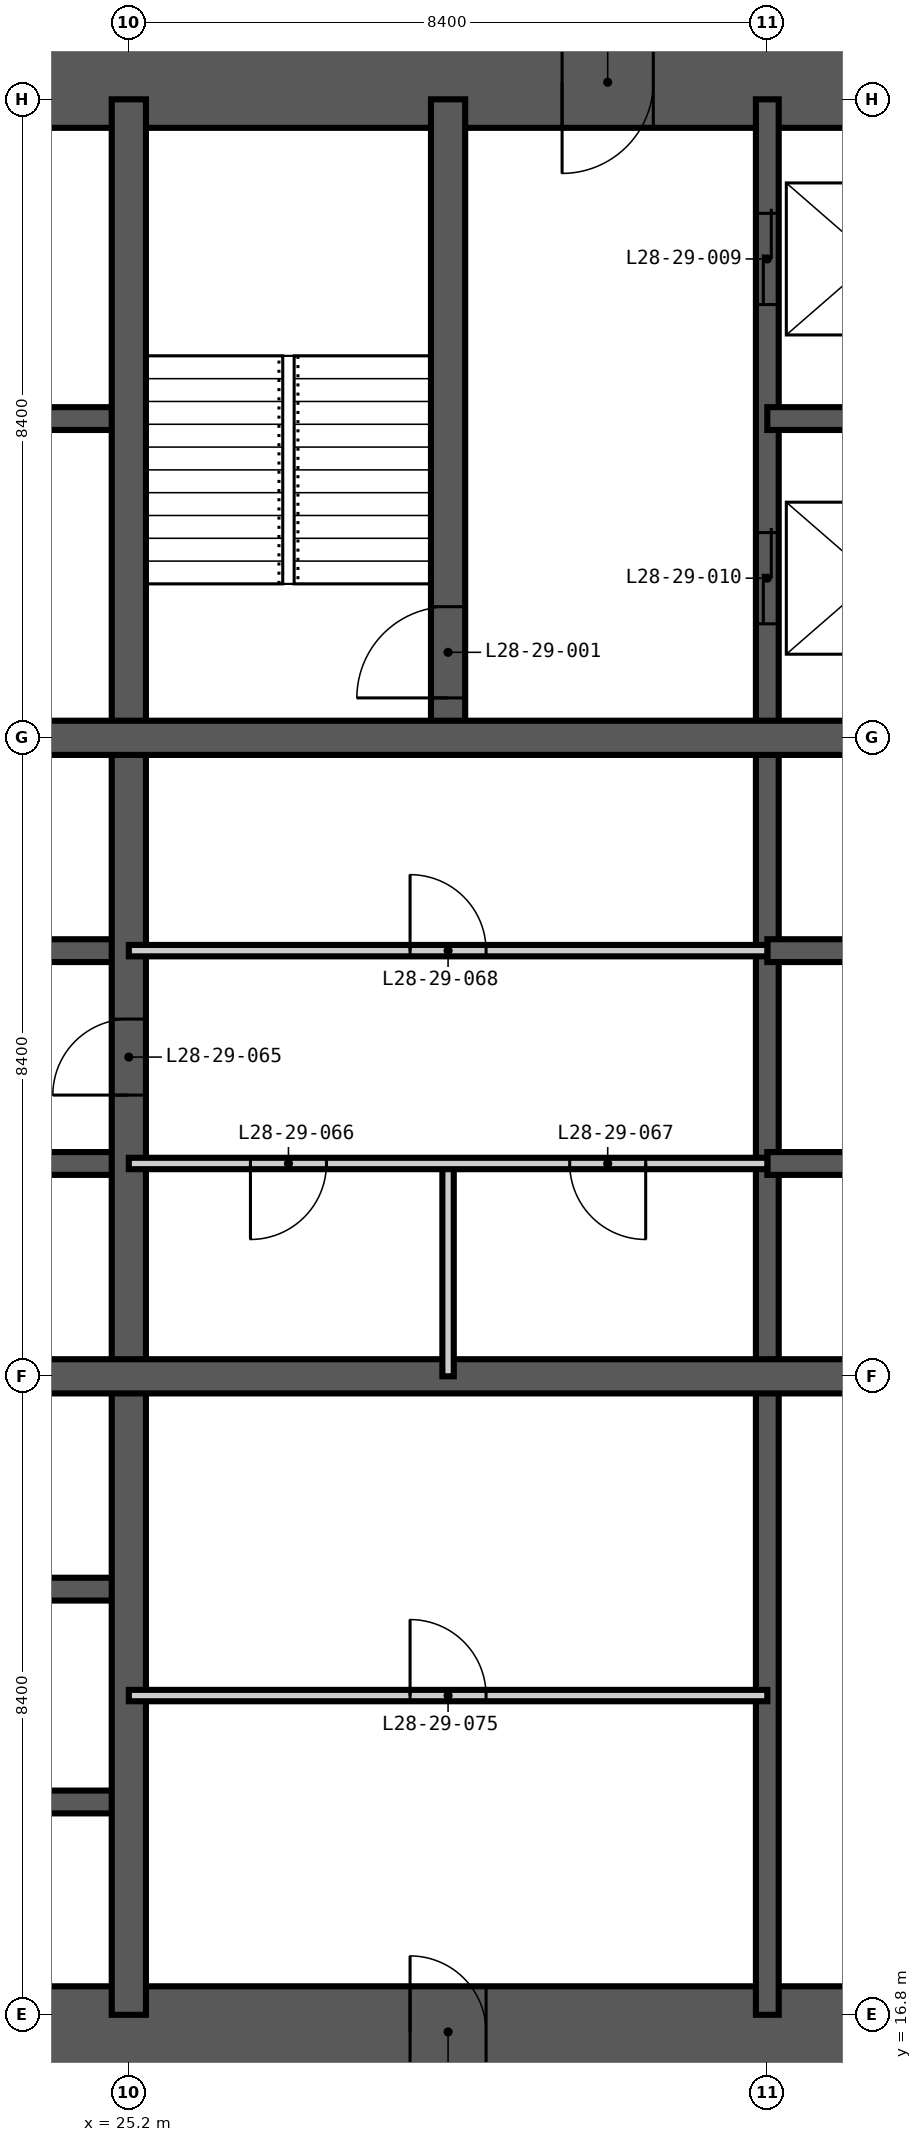
"""IFC4 building model, lengths in metres.
Left out: names, types, materials, properties, quantities, classifications, styles, units other than length and angle.
Written with IfcOpenShell. Run it as: python <this file> out.ifc"""

import sys

from ifc_helpers import new_model, si_unit, direction, frame, frame_2d, origin, place, context, subcontext, project, spatial, rectangle, extrude, element, fill, save


model = new_model("IFC4")
c1 = context("Model", 3, precision=1e-05, world=origin(), true_north=direction((0.0, 1.0)))
c2 = subcontext(c1, "Body", "Model", "MODEL_VIEW")
j1 = project(units=[si_unit("LENGTHUNIT", "METRE"), si_unit("PLANEANGLEUNIT", "RADIAN")], contexts=[c1])
p1 = place(None, origin())
s1 = spatial("IfcSite", under=j1, at=p1, CompositionType="ELEMENT")
p2 = place(p1, origin())
s2 = spatial("IfcBuilding", under=s1, at=p2, CompositionType="ELEMENT")
p3 = place(p2, frame((0.0, 0.0, 111.6)))
s3 = spatial("IfcBuildingStorey", under=s2, at=p3, CompositionType="ELEMENT", Elevation=111.6)
p4 = place(p3, frame((15.975, 16.575, -0.35), z_axis=(0.0, 0.0, 1.0), x_axis=(1.0, 0.0, 0.0)))
e1 = element("IfcWall", 1, at=p4, inside=s3, PredefinedType="SHEAR", context=c2, shape_type="SweptSolid", body=[
    extrude(rectangle(XDim=26.85, YDim=1.2, at=frame_2d((13.425, 0.0))), origin(), (0.0, 0.0, 1.0), 3.6),
])
p5 = place(p4, frame((12.925, 0.0, 0.35)))
e2 = element("IfcOpeningElement", 2, at=p5, cuts=e1, PredefinedType="OPENING", context=c2, shape_type="SweptSolid", body=[
    extrude(rectangle(XDim=1.0, YDim=2.1, at=frame_2d((0.5, 1.05))), frame((0.0, 0.61, 0.0), z_axis=(0.0, -1.0, 0.0), x_axis=(1.0, 0.0, 0.0)), (0.0, 0.0, 1.0), 1.22),
])
p6 = place(p4, frame((19.225, 0.0, 0.35)))
e3 = element("IfcOpeningElement", 3, at=p6, cuts=e1, PredefinedType="OPENING", context=c2, shape_type="SweptSolid", body=[
    extrude(rectangle(XDim=1.0, YDim=2.1, at=frame_2d((0.5, 1.05))), frame((0.0, 0.61, 0.0), z_axis=(0.0, -1.0, 0.0), x_axis=(1.0, 0.0, 0.0)), (0.0, 0.0, 1.0), 1.22),
])
p7 = place(p3, frame((42.825, 42.225, -0.35), z_axis=(0.0, 0.0, 1.0), x_axis=(-1.0, 0.0, 0.0)))
e4 = element("IfcWall", 4, at=p7, inside=s3, PredefinedType="SHEAR", context=c2, shape_type="SweptSolid", body=[
    extrude(rectangle(XDim=26.85, YDim=1.2, at=frame_2d((13.425, 0.0))), origin(), (0.0, 0.0, 1.0), 3.6),
])
p8 = place(p7, frame((21.325, 0.0, 0.35)))
e5 = element("IfcOpeningElement", 5, at=p8, cuts=e4, PredefinedType="OPENING", context=c2, shape_type="SweptSolid", body=[
    extrude(rectangle(XDim=1.0, YDim=2.1, at=frame_2d((0.5, 1.05))), frame((0.0, 0.61, 0.0), z_axis=(0.0, -1.0, 0.0), x_axis=(1.0, 0.0, 0.0)), (0.0, 0.0, 1.0), 1.22),
])
p9 = place(p7, frame((10.725, 0.0, 0.35)))
e6 = element("IfcOpeningElement", 6, at=p9, cuts=e4, PredefinedType="OPENING", context=c2, shape_type="SweptSolid", body=[
    extrude(rectangle(XDim=1.2, YDim=2.2, at=frame_2d((0.6, 1.1))), frame((0.0, 0.61, 0.0), z_axis=(0.0, -1.0, 0.0), x_axis=(1.0, 0.0, 0.0)), (0.0, 0.0, 1.0), 1.22),
])
p10 = place(p3, frame((33.6, 16.8, -0.35), z_axis=(0.0, 0.0, 1.0), x_axis=(0.0, 1.0, 0.0)))
e7 = element("IfcWall", 7, at=p10, inside=s3, PredefinedType="SHEAR", context=c2, shape_type="SweptSolid", body=[
    extrude(rectangle(XDim=25.2, YDim=0.3, at=frame_2d((12.6, 0.0))), origin(), (0.0, 0.0, 1.0), 3.6),
])
p11 = place(p10, frame((22.5, 0.0, 0.35)))
e8 = element("IfcOpeningElement", 8, at=p11, cuts=e7, PredefinedType="OPENING", context=c2, shape_type="SweptSolid", body=[
    extrude(rectangle(XDim=1.2, YDim=2.2, at=frame_2d((0.6, 1.1))), frame((0.0, 0.16, 0.0), z_axis=(0.0, -1.0, 0.0), x_axis=(1.0, 0.0, 0.0)), (0.0, 0.0, 1.0), 0.32),
])
p12 = place(p10, frame((18.3, 0.0, 0.35)))
e9 = element("IfcOpeningElement", 9, at=p12, cuts=e7, PredefinedType="OPENING", context=c2, shape_type="SweptSolid", body=[
    extrude(rectangle(XDim=1.2, YDim=2.2, at=frame_2d((0.6, 1.1))), frame((0.0, 0.16, 0.0), z_axis=(0.0, -1.0, 0.0), x_axis=(1.0, 0.0, 0.0)), (0.0, 0.0, 1.0), 0.32),
])
for number, where, z_axis, x_axis in (
    (10, (16.8, 19.6, -0.35), (0.0, 0.0, 1.0), (1.0, 0.0, 0.0)),
    (11, (16.8, 22.4, -0.35), (0.0, 0.0, 1.0), (1.0, 0.0, 0.0)),
):
    element("IfcWall", number, at=place(p3, frame(where, z_axis=z_axis, x_axis=x_axis)), inside=s3, PredefinedType="SHEAR", context=c2, shape_type="SweptSolid", body=[
        extrude(rectangle(XDim=8.4, YDim=0.3, at=frame_2d((4.2, 0.0))), origin(), (0.0, 0.0, 1.0), 3.6),
    ])
p13 = place(p3, frame((16.8, 28.0, -0.35), z_axis=(0.0, 0.0, 1.0), x_axis=(1.0, 0.0, 0.0)))
e12 = element("IfcWall", 12, at=p13, inside=s3, PredefinedType="SHEAR", context=c2, shape_type="SweptSolid", body=[
    extrude(rectangle(XDim=8.4, YDim=0.3, at=frame_2d((4.2, 0.0))), origin(), (0.0, 0.0, 1.0), 3.6),
])
p14 = place(p13, frame((1.55, 0.0, 0.35)))
e13 = element("IfcOpeningElement", 13, at=p14, cuts=e12, PredefinedType="OPENING", context=c2, shape_type="SweptSolid", body=[
    extrude(rectangle(XDim=1.1, YDim=2.2, at=frame_2d((0.55, 1.1))), frame((0.0, 0.16, 0.0), z_axis=(0.0, -1.0, 0.0), x_axis=(1.0, 0.0, 0.0)), (0.0, 0.0, 1.0), 0.32),
])
p15 = place(p13, frame((5.75, 0.0, 0.35)))
e14 = element("IfcOpeningElement", 14, at=p15, cuts=e12, PredefinedType="OPENING", context=c2, shape_type="SweptSolid", body=[
    extrude(rectangle(XDim=1.1, YDim=2.2, at=frame_2d((0.55, 1.1))), frame((0.0, 0.16, 0.0), z_axis=(0.0, -1.0, 0.0), x_axis=(1.0, 0.0, 0.0)), (0.0, 0.0, 1.0), 0.32),
])
p16 = place(p3, frame((33.6, 28.0, -0.35), z_axis=(0.0, 0.0, 1.0), x_axis=(1.0, 0.0, 0.0)))
e15 = element("IfcWall", 15, at=p16, inside=s3, PredefinedType="SHEAR", context=c2, shape_type="SweptSolid", body=[
    extrude(rectangle(XDim=8.4, YDim=0.3, at=frame_2d((4.2, 0.0))), origin(), (0.0, 0.0, 1.0), 3.6),
])
p17 = place(p16, frame((1.55, 0.0, 0.35)))
e16 = element("IfcOpeningElement", 16, at=p17, cuts=e15, PredefinedType="OPENING", context=c2, shape_type="SweptSolid", body=[
    extrude(rectangle(XDim=1.1, YDim=2.2, at=frame_2d((0.55, 1.1))), frame((0.0, 0.16, 0.0), z_axis=(0.0, -1.0, 0.0), x_axis=(1.0, 0.0, 0.0)), (0.0, 0.0, 1.0), 0.32),
])
p18 = place(p16, frame((5.75, 0.0, 0.35)))
e17 = element("IfcOpeningElement", 17, at=p18, cuts=e15, PredefinedType="OPENING", context=c2, shape_type="SweptSolid", body=[
    extrude(rectangle(XDim=1.1, YDim=2.2, at=frame_2d((0.55, 1.1))), frame((0.0, 0.16, 0.0), z_axis=(0.0, -1.0, 0.0), x_axis=(1.0, 0.0, 0.0)), (0.0, 0.0, 1.0), 0.32),
])
p19 = place(p3, frame((16.8, 30.8, -0.35), z_axis=(0.0, 0.0, 1.0), x_axis=(1.0, 0.0, 0.0)))
e18 = element("IfcWall", 18, at=p19, inside=s3, PredefinedType="SHEAR", context=c2, shape_type="SweptSolid", body=[
    extrude(rectangle(XDim=8.4, YDim=0.3, at=frame_2d((4.2, 0.0))), origin(), (0.0, 0.0, 1.0), 3.6),
])
p20 = place(p19, frame((1.55, 0.0, 0.35)))
e19 = element("IfcOpeningElement", 19, at=p20, cuts=e18, PredefinedType="OPENING", context=c2, shape_type="SweptSolid", body=[
    extrude(rectangle(XDim=1.1, YDim=2.2, at=frame_2d((0.55, 1.1))), frame((0.0, 0.16, 0.0), z_axis=(0.0, -1.0, 0.0), x_axis=(1.0, 0.0, 0.0)), (0.0, 0.0, 1.0), 0.32),
])
p21 = place(p19, frame((5.75, 0.0, 0.35)))
e20 = element("IfcOpeningElement", 20, at=p21, cuts=e18, PredefinedType="OPENING", context=c2, shape_type="SweptSolid", body=[
    extrude(rectangle(XDim=1.1, YDim=2.2, at=frame_2d((0.55, 1.1))), frame((0.0, 0.16, 0.0), z_axis=(0.0, -1.0, 0.0), x_axis=(1.0, 0.0, 0.0)), (0.0, 0.0, 1.0), 0.32),
])
for number, where, z_axis, x_axis in (
    (21, (33.6, 30.8, -0.35), (0.0, 0.0, 1.0), (1.0, 0.0, 0.0)),
    (22, (16.8, 37.8, -0.35), (0.0, 0.0, 1.0), (1.0, 0.0, 0.0)),
):
    element("IfcWall", number, at=place(p3, frame(where, z_axis=z_axis, x_axis=x_axis)), inside=s3, PredefinedType="SHEAR", context=c2, shape_type="SweptSolid", body=[
        extrude(rectangle(XDim=8.4, YDim=0.3, at=frame_2d((4.2, 0.0))), origin(), (0.0, 0.0, 1.0), 3.6),
    ])
p22 = place(p3, frame((33.6, 37.8, -0.35), z_axis=(0.0, 0.0, 1.0), x_axis=(1.0, 0.0, 0.0)))
e23 = element("IfcWall", 23, at=p22, inside=s3, PredefinedType="SHEAR", context=c2, shape_type="SweptSolid", body=[
    extrude(rectangle(XDim=2.8, YDim=0.3, at=frame_2d((1.4, 0.0))), origin(), (0.0, 0.0, 1.0), 3.6),
])
p23 = place(p3, frame((25.2, 16.8, -0.35), z_axis=(0.0, 0.0, 1.0), x_axis=(0.0, 1.0, 0.0)))
e24 = element("IfcWall", 24, at=p23, inside=s3, PredefinedType="SHEAR", context=c2, shape_type="SweptSolid", body=[
    extrude(rectangle(XDim=25.2, YDim=0.45, at=frame_2d((12.6, 0.0))), origin(), (0.0, 0.0, 1.0), 3.6),
])
p24 = place(p23, frame((12.1, 0.0, 0.35)))
e25 = element("IfcOpeningElement", 25, at=p24, cuts=e24, PredefinedType="OPENING", context=c2, shape_type="SweptSolid", body=[
    extrude(rectangle(XDim=1.0, YDim=2.1, at=frame_2d((0.5, 1.05))), frame((0.0, 0.235, 0.0), z_axis=(0.0, -1.0, 0.0), x_axis=(1.0, 0.0, 0.0)), (0.0, 0.0, 1.0), 0.47),
])
p25 = place(p3, frame((29.4, 33.6, -0.35), z_axis=(0.0, 0.0, 1.0), x_axis=(0.0, 1.0, 0.0)))
e26 = element("IfcWall", 26, at=p25, inside=s3, PredefinedType="SHEAR", context=c2, shape_type="SweptSolid", body=[
    extrude(rectangle(XDim=8.4, YDim=0.45, at=frame_2d((4.2, 0.0))), origin(), (0.0, 0.0, 1.0), 3.6),
])
p26 = place(p25, frame((0.525, 0.0, 0.35)))
e27 = element("IfcOpeningElement", 27, at=p26, cuts=e26, PredefinedType="OPENING", context=c2, shape_type="SweptSolid", body=[
    extrude(rectangle(XDim=1.2, YDim=2.2, at=frame_2d((0.6, 1.1))), frame((0.0, 0.235, 0.0), z_axis=(0.0, -1.0, 0.0), x_axis=(1.0, 0.0, 0.0)), (0.0, 0.0, 1.0), 0.47),
])
p27 = place(p3, frame((16.8, 25.2, -0.35), z_axis=(0.0, 0.0, 1.0), x_axis=(1.0, 0.0, 0.0)))
e28 = element("IfcWall", 28, at=p27, inside=s3, PredefinedType="SHEAR", context=c2, shape_type="SweptSolid", body=[
    extrude(rectangle(XDim=25.2, YDim=0.45, at=frame_2d((12.6, 0.0))), origin(), (0.0, 0.0, 1.0), 3.6),
])
p28 = place(p3, frame((16.8, 33.6, -0.35), z_axis=(0.0, 0.0, 1.0), x_axis=(1.0, 0.0, 0.0)))
e29 = element("IfcWall", 29, at=p28, inside=s3, PredefinedType="SHEAR", context=c2, shape_type="SweptSolid", body=[
    extrude(rectangle(XDim=25.2, YDim=0.45, at=frame_2d((12.6, 0.0))), origin(), (0.0, 0.0, 1.0), 3.6),
])
p29 = place(p28, frame((22.6, 0.0, 0.35)))
e30 = element("IfcOpeningElement", 30, at=p29, cuts=e29, PredefinedType="OPENING", context=c2, shape_type="SweptSolid", body=[
    extrude(rectangle(XDim=1.0, YDim=2.1, at=frame_2d((0.5, 1.05))), frame((0.0, 0.235, 0.0), z_axis=(0.0, -1.0, 0.0), x_axis=(1.0, 0.0, 0.0)), (0.0, 0.0, 1.0), 0.47),
])
p30 = place(p3, frame((29.4, 25.2, 0.0), z_axis=(0.0, 0.0, 1.0), x_axis=(0.0, 1.0, 0.0)))
e31 = element("IfcWall", 31, at=p30, inside=s3, PredefinedType="PARTITIONING", context=c2, shape_type="SweptSolid", body=[
    extrude(rectangle(XDim=2.8, YDim=0.15, at=frame_2d((1.4, 0.0))), origin(), (0.0, 0.0, 1.0), 3.25),
])
p31 = place(p3, frame((25.2, 21.0, 0.0), z_axis=(0.0, 0.0, 1.0), x_axis=(1.0, 0.0, 0.0)))
e32 = element("IfcWall", 32, at=p31, inside=s3, PredefinedType="PARTITIONING", context=c2, shape_type="SweptSolid", body=[
    extrude(rectangle(XDim=8.4, YDim=0.15, at=frame_2d((4.2, 0.0))), origin(), (0.0, 0.0, 1.0), 3.25),
])
p32 = place(p31, frame((3.7, 0.0, 0.0)))
e33 = element("IfcOpeningElement", 33, at=p32, cuts=e32, PredefinedType="OPENING", context=c2, shape_type="SweptSolid", body=[
    extrude(rectangle(XDim=1.0, YDim=2.1, at=frame_2d((0.5, 1.05))), frame((0.0, 0.085, 0.0), z_axis=(0.0, -1.0, 0.0), x_axis=(1.0, 0.0, 0.0)), (0.0, 0.0, 1.0), 0.17),
])
p33 = place(p3, frame((25.2, 28.0, 0.0), z_axis=(0.0, 0.0, 1.0), x_axis=(1.0, 0.0, 0.0)))
e34 = element("IfcWall", 34, at=p33, inside=s3, PredefinedType="PARTITIONING", context=c2, shape_type="SweptSolid", body=[
    extrude(rectangle(XDim=8.4, YDim=0.15, at=frame_2d((4.2, 0.0))), origin(), (0.0, 0.0, 1.0), 3.25),
])
p34 = place(p33, frame((1.6, 0.0, 0.0)))
e35 = element("IfcOpeningElement", 35, at=p34, cuts=e34, PredefinedType="OPENING", context=c2, shape_type="SweptSolid", body=[
    extrude(rectangle(XDim=1.0, YDim=2.1, at=frame_2d((0.5, 1.05))), frame((0.0, 0.085, 0.0), z_axis=(0.0, -1.0, 0.0), x_axis=(1.0, 0.0, 0.0)), (0.0, 0.0, 1.0), 0.17),
])
p35 = place(p33, frame((5.8, 0.0, 0.0)))
e36 = element("IfcOpeningElement", 36, at=p35, cuts=e34, PredefinedType="OPENING", context=c2, shape_type="SweptSolid", body=[
    extrude(rectangle(XDim=1.0, YDim=2.1, at=frame_2d((0.5, 1.05))), frame((0.0, 0.085, 0.0), z_axis=(0.0, -1.0, 0.0), x_axis=(1.0, 0.0, 0.0)), (0.0, 0.0, 1.0), 0.17),
])
p36 = place(p3, frame((25.2, 30.8, 0.0), z_axis=(0.0, 0.0, 1.0), x_axis=(1.0, 0.0, 0.0)))
e37 = element("IfcWall", 37, at=p36, inside=s3, PredefinedType="PARTITIONING", context=c2, shape_type="SweptSolid", body=[
    extrude(rectangle(XDim=8.4, YDim=0.15, at=frame_2d((4.2, 0.0))), origin(), (0.0, 0.0, 1.0), 3.25),
])
p37 = place(p36, frame((3.7, 0.0, 0.0)))
e38 = element("IfcOpeningElement", 38, at=p37, cuts=e37, PredefinedType="OPENING", context=c2, shape_type="SweptSolid", body=[
    extrude(rectangle(XDim=1.0, YDim=2.1, at=frame_2d((0.5, 1.05))), frame((0.0, 0.085, 0.0), z_axis=(0.0, -1.0, 0.0), x_axis=(1.0, 0.0, 0.0)), (0.0, 0.0, 1.0), 0.17),
])
p38 = place(p26, origin())
e39 = element("IfcDoor", 39, at=p38, inside=s3, OperationType="SINGLE_SWING_LEFT", PredefinedType="DOOR", context=c2, shape_type="SweptSolid", body=[
    extrude(rectangle(XDim=1.2, YDim=2.2, at=frame_2d((0.6, 1.1))), frame((0.0, 0.025, 0.0), z_axis=(0.0, -1.0, 0.0), x_axis=(1.0, 0.0, 0.0)), (0.0, 0.0, 1.0), 0.05),
])
fill(e27, e39)
p39 = place(p11, origin())
e40 = element("IfcDoor", 40, at=p39, inside=s3, OperationType="DOUBLE_DOOR_SLIDING", PredefinedType="DOOR", context=c2, shape_type="SweptSolid", body=[
    extrude(rectangle(XDim=1.2, YDim=2.2, at=frame_2d((0.6, 1.1))), frame((0.0, 0.025, 0.0), z_axis=(0.0, -1.0, 0.0), x_axis=(1.0, 0.0, 0.0)), (0.0, 0.0, 1.0), 0.05),
])
fill(e8, e40)
p40 = place(p12, origin())
e41 = element("IfcDoor", 41, at=p40, inside=s3, OperationType="DOUBLE_DOOR_SLIDING", PredefinedType="DOOR", context=c2, shape_type="SweptSolid", body=[
    extrude(rectangle(XDim=1.2, YDim=2.2, at=frame_2d((0.6, 1.1))), frame((0.0, 0.025, 0.0), z_axis=(0.0, -1.0, 0.0), x_axis=(1.0, 0.0, 0.0)), (0.0, 0.0, 1.0), 0.05),
])
fill(e9, e41)
p41 = place(p24, origin())
e42 = element("IfcDoor", 42, at=p41, inside=s3, OperationType="SINGLE_SWING_LEFT", PredefinedType="DOOR", context=c2, shape_type="SweptSolid", body=[
    extrude(rectangle(XDim=1.0, YDim=2.1, at=frame_2d((0.5, 1.05))), frame((0.0, 0.025, 0.0), z_axis=(0.0, -1.0, 0.0), x_axis=(1.0, 0.0, 0.0)), (0.0, 0.0, 1.0), 0.05),
])
fill(e25, e42)
p42 = place(p34, frame((1.0, 0.0, 0.0), z_axis=(0.0, 0.0, 1.0), x_axis=(-1.0, 0.0, 0.0)))
e43 = element("IfcDoor", 43, at=p42, inside=s3, OperationType="SINGLE_SWING_RIGHT", PredefinedType="DOOR", context=c2, shape_type="SweptSolid", body=[
    extrude(rectangle(XDim=1.0, YDim=2.1, at=frame_2d((0.5, 1.05))), frame((0.0, 0.025, 0.0), z_axis=(0.0, -1.0, 0.0), x_axis=(1.0, 0.0, 0.0)), (0.0, 0.0, 1.0), 0.05),
])
fill(e35, e43)
p43 = place(p35, frame((1.0, 0.0, 0.0), z_axis=(0.0, 0.0, 1.0), x_axis=(-1.0, 0.0, 0.0)))
e44 = element("IfcDoor", 44, at=p43, inside=s3, OperationType="SINGLE_SWING_LEFT", PredefinedType="DOOR", context=c2, shape_type="SweptSolid", body=[
    extrude(rectangle(XDim=1.0, YDim=2.1, at=frame_2d((0.5, 1.05))), frame((0.0, 0.025, 0.0), z_axis=(0.0, -1.0, 0.0), x_axis=(1.0, 0.0, 0.0)), (0.0, 0.0, 1.0), 0.05),
])
fill(e36, e44)
p44 = place(p37, origin())
e45 = element("IfcDoor", 45, at=p44, inside=s3, OperationType="SINGLE_SWING_LEFT", PredefinedType="DOOR", context=c2, shape_type="SweptSolid", body=[
    extrude(rectangle(XDim=1.0, YDim=2.1, at=frame_2d((0.5, 1.05))), frame((0.0, 0.025, 0.0), z_axis=(0.0, -1.0, 0.0), x_axis=(1.0, 0.0, 0.0)), (0.0, 0.0, 1.0), 0.05),
])
fill(e38, e45)
p45 = place(p9, origin())
e46 = element("IfcDoor", 46, at=p45, inside=s3, OperationType="SINGLE_SWING_RIGHT", PredefinedType="DOOR", context=c2, shape_type="SweptSolid", body=[
    extrude(rectangle(XDim=1.2, YDim=2.2, at=frame_2d((0.6, 1.1))), frame((0.0, 0.025, 0.0), z_axis=(0.0, -1.0, 0.0), x_axis=(1.0, 0.0, 0.0)), (0.0, 0.0, 1.0), 0.05),
])
fill(e6, e46)
p46 = place(p5, origin())
e47 = element("IfcDoor", 47, at=p46, inside=s3, OperationType="SINGLE_SWING_LEFT", PredefinedType="DOOR", context=c2, shape_type="SweptSolid", body=[
    extrude(rectangle(XDim=1.0, YDim=2.1, at=frame_2d((0.5, 1.05))), frame((0.0, 0.025, 0.0), z_axis=(0.0, -1.0, 0.0), x_axis=(1.0, 0.0, 0.0)), (0.0, 0.0, 1.0), 0.05),
])
fill(e2, e47)
p47 = place(p32, origin())
e48 = element("IfcDoor", 48, at=p47, inside=s3, OperationType="SINGLE_SWING_LEFT", PredefinedType="DOOR", context=c2, shape_type="SweptSolid", body=[
    extrude(rectangle(XDim=1.0, YDim=2.1, at=frame_2d((0.5, 1.05))), frame((0.0, 0.025, 0.0), z_axis=(0.0, -1.0, 0.0), x_axis=(1.0, 0.0, 0.0)), (0.0, 0.0, 1.0), 0.05),
])
fill(e33, e48)
save(model, sys.argv[1])
